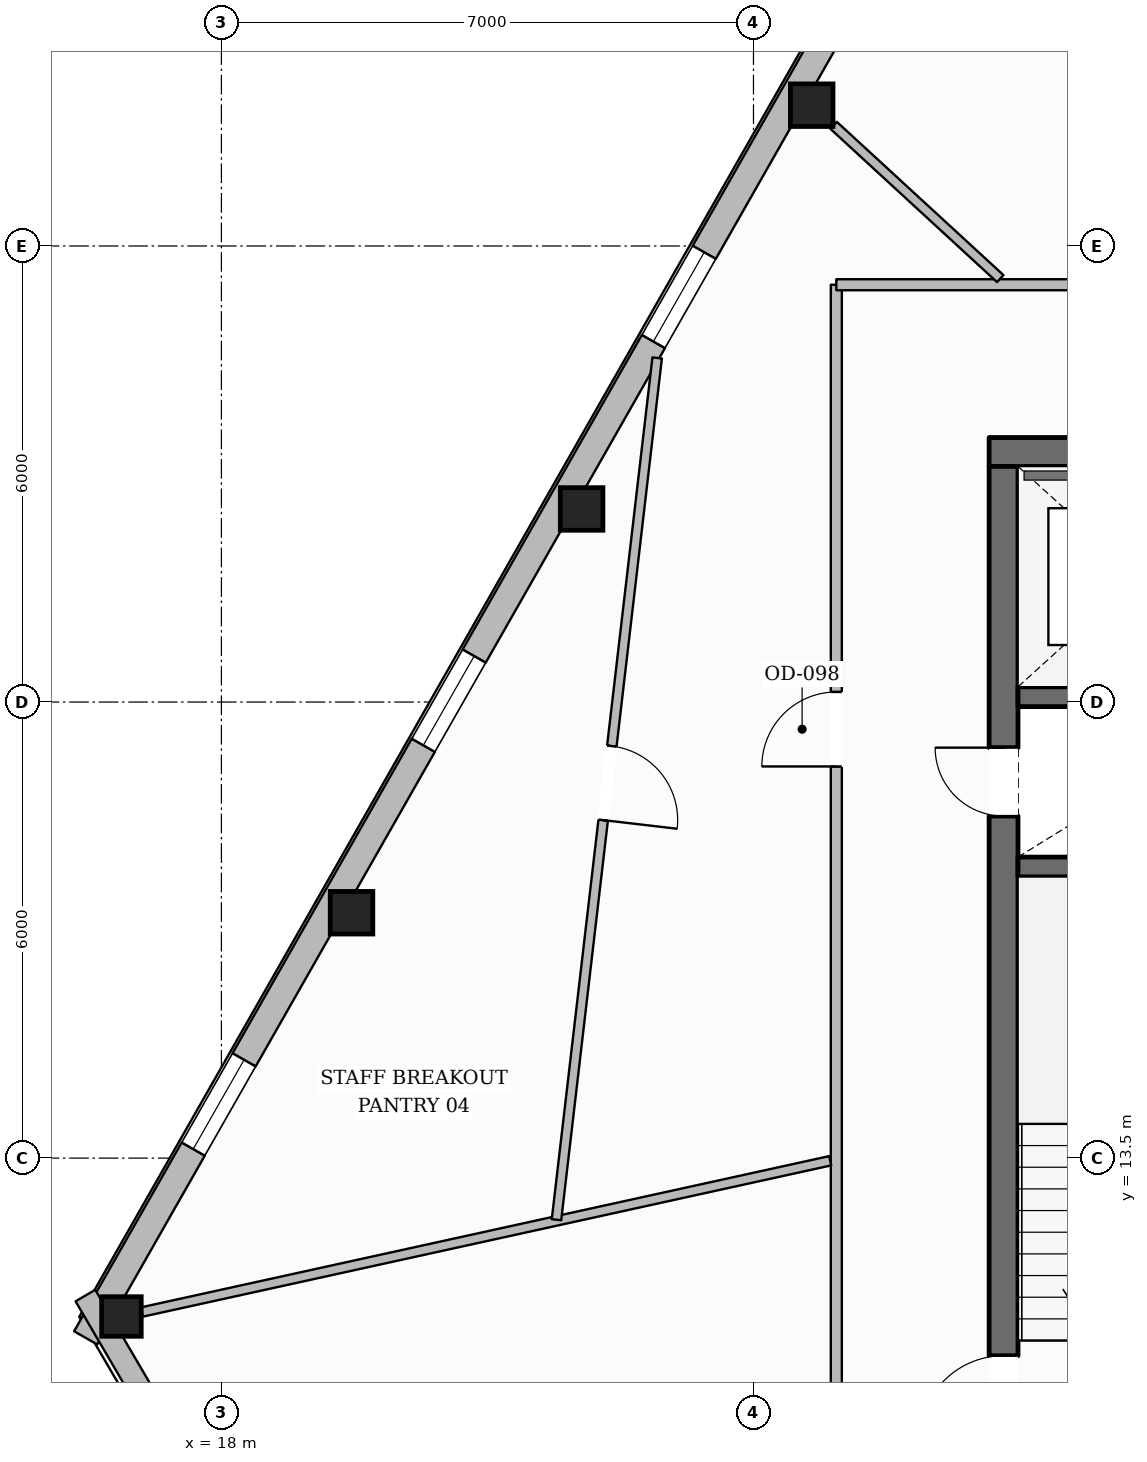
"""IFC4 building model, lengths in metres.
Left out: names, types, materials, properties, quantities, classifications, styles, units other than length and angle.
Written with IfcOpenShell. Run it as: python <this file> out.ifc"""

import sys

from ifc_helpers import new_model, si_unit, direction, frame, frame_2d, origin, origin_2d, place, context, subcontext, project, spatial, rectangle, hollow_rectangle, extrude, element, fill, save


model = new_model("IFC4")
c1 = context("Model", 3, precision=1e-05, world=origin(), true_north=direction((0.0, 1.0)))
c2 = subcontext(c1, "Body", "Model", "MODEL_VIEW")
j1 = project(units=[si_unit("LENGTHUNIT", "METRE"), si_unit("PLANEANGLEUNIT", "RADIAN")], contexts=[c1])
p1 = place(None, origin())
s1 = spatial("IfcSite", under=j1, at=p1, CompositionType="ELEMENT")
p2 = place(p1, origin())
s2 = spatial("IfcBuilding", under=s1, at=p2, CompositionType="ELEMENT")
p3 = place(p2, frame((0.0, 0.0, 258.75)))
s3 = spatial("IfcBuildingStorey", under=s2, at=p3, CompositionType="ELEMENT", Elevation=258.75)
p4 = place(p3, frame((28.1, 22.79, 0.0), z_axis=(0.0, 0.0, 1.0), x_axis=(1.0, 0.0, 0.0)))
e1 = element("IfcWall", 1, at=p4, inside=s3, PredefinedType="SOLIDWALL", context=c2, shape_type="SweptSolid", body=[
    extrude(rectangle(XDim=19.8, YDim=0.38, at=frame_2d((9.9, 0.0))), origin(), (0.0, 0.0, 1.0), 3.61),
])
p5 = place(p4, frame((6.175, 0.0, 0.0)))
e2 = element("IfcOpeningElement", 2, at=p5, cuts=e1, PredefinedType="OPENING", context=c2, shape_type="SweptSolid", body=[
    extrude(rectangle(XDim=1.05, YDim=2.15, at=frame_2d((0.525, 1.075))), frame((0.0, 0.2, 0.0), z_axis=(0.0, -1.0, 0.0), x_axis=(1.0, 0.0, 0.0)), (0.0, 0.0, 1.0), 0.4),
])
p6 = place(p4, frame((12.575, 0.0, 0.0)))
e3 = element("IfcOpeningElement", 3, at=p6, cuts=e1, PredefinedType="OPENING", context=c2, shape_type="SweptSolid", body=[
    extrude(rectangle(XDim=1.05, YDim=2.15, at=frame_2d((0.525, 1.075))), frame((0.0, 0.2, 0.0), z_axis=(0.0, -1.0, 0.0), x_axis=(1.0, 0.0, 0.0)), (0.0, 0.0, 1.0), 0.4),
])
p7 = place(p3, frame((28.29, 9.6, 0.0), z_axis=(0.0, 0.0, 1.0), x_axis=(0.0, 1.0, 0.0)))
e4 = element("IfcWall", 4, at=p7, inside=s3, PredefinedType="SOLIDWALL", context=c2, shape_type="SweptSolid", body=[
    extrude(rectangle(XDim=13.0, YDim=0.38, at=frame_2d((6.5, 0.0))), origin(), (0.0, 0.0, 1.0), 3.61),
])
p8 = place(p7, frame((0.2, 0.0, 0.0)))
e5 = element("IfcOpeningElement", 5, at=p8, cuts=e4, PredefinedType="OPENING", context=c2, shape_type="SweptSolid", body=[
    extrude(rectangle(XDim=1.1, YDim=2.15, at=frame_2d((0.55, 1.075))), frame((0.0, 0.2, 0.0), z_axis=(0.0, -1.0, 0.0), x_axis=(1.0, 0.0, 0.0)), (0.0, 0.0, 1.0), 0.4),
])
p9 = place(p7, frame((8.4, 0.0, 0.0)))
e6 = element("IfcOpeningElement", 6, at=p9, cuts=e4, PredefinedType="OPENING", context=c2, shape_type="SweptSolid", body=[
    extrude(rectangle(XDim=0.9, YDim=2.1, at=frame_2d((0.45, 1.05))), frame((0.0, 0.2, 0.0), z_axis=(0.0, -1.0, 0.0), x_axis=(1.0, 0.0, 0.0)), (0.0, 0.0, 1.0), 0.4),
])
for number, where, z_axis, x_axis in (
    (7, (28.48, 17.33, 0.0), (0.0, 0.0, 1.0), (1.0, 0.0, 0.0)),
    (8, (28.48, 19.57, 0.0), (0.0, 0.0, 1.0), (1.0, 0.0, 0.0)),
):
    element("IfcWall", number, at=place(p3, frame(where, z_axis=z_axis, x_axis=x_axis)), inside=s3, PredefinedType="SHEAR", context=c2, shape_type="SweptSolid", body=[
        extrude(rectangle(XDim=3.2, YDim=0.26, at=frame_2d((1.6, 0.0))), origin(), (0.0, 0.0, 1.0), 3.61),
    ])
for number, where, z_axis, x_axis in (
    (9, (25.766, 27.352, 0.0), (0.0, 0.0, 1.0), (1.0, 0.0, 0.0)),
    (10, (22.739, 22.04, 0.0), (0.0, 0.0, 1.0), (1.0, 0.0, 0.0)),
    (11, (19.712, 16.728, 0.0), (0.0, 0.0, 1.0), (1.0, 0.0, 0.0)),
):
    element("IfcColumn", number, at=place(p3, frame(where, z_axis=z_axis, x_axis=x_axis)), inside=s3, PredefinedType="COLUMN", context=c2, shape_type="SweptSolid", body=[
        extrude(hollow_rectangle(XDim=0.56, YDim=0.56, WallThickness=0.025, at=origin_2d()), origin(), (0.0, 0.0, 1.0), 3.61),
    ])
p10 = place(p3, frame((16.685, 11.416, 0.0), z_axis=(0.0, 0.0, 1.0), x_axis=(1.0, 0.0, 0.0)))
e12 = element("IfcColumn", 12, at=p10, inside=s3, PredefinedType="COLUMN", context=c2, shape_type="SweptSolid", body=[
    extrude(hollow_rectangle(XDim=0.52, YDim=0.52, WallThickness=0.024, at=origin_2d()), origin(), (0.0, 0.0, 1.0), 3.61),
])
p11 = place(p3, frame((16.214, 11.135, 0.0), z_axis=(0.0, 0.0, 1.0), x_axis=(0.49510347201, 0.868834018673, 0.0)))
e13 = element("IfcWall", 13, at=p11, inside=s3, PredefinedType="STANDARD", context=c2, shape_type="SweptSolid", body=[
    extrude(rectangle(XDim=37.643, YDim=0.35, at=frame_2d((18.822, 0.0))), origin(), (0.0, 0.0, 1.0), 3.196),
])
p12 = place(p11, frame((33.429, 0.0, 0.65)))
e14 = element("IfcOpeningElement", 14, at=p12, cuts=e13, PredefinedType="OPENING", context=c2, shape_type="SweptSolid", body=[
    extrude(rectangle(XDim=1.35, YDim=1.75, at=frame_2d((0.675, 0.875))), frame((0.0, 0.185, 0.0), z_axis=(0.0, -1.0, 0.0), x_axis=(1.0, 0.0, 0.0)), (0.0, 0.0, 1.0), 0.37),
])
p13 = place(p11, frame((27.315, 0.0, 0.65)))
e15 = element("IfcOpeningElement", 15, at=p13, cuts=e13, PredefinedType="OPENING", context=c2, shape_type="SweptSolid", body=[
    extrude(rectangle(XDim=1.35, YDim=1.75, at=frame_2d((0.675, 0.875))), frame((0.0, 0.185, 0.0), z_axis=(0.0, -1.0, 0.0), x_axis=(1.0, 0.0, 0.0)), (0.0, 0.0, 1.0), 0.37),
])
p14 = place(p11, frame((15.087, 0.0, 0.65)))
e16 = element("IfcOpeningElement", 16, at=p14, cuts=e13, PredefinedType="OPENING", context=c2, shape_type="SweptSolid", body=[
    extrude(rectangle(XDim=1.35, YDim=1.75, at=frame_2d((0.675, 0.875))), frame((0.0, 0.185, 0.0), z_axis=(0.0, -1.0, 0.0), x_axis=(1.0, 0.0, 0.0)), (0.0, 0.0, 1.0), 0.37),
])
p15 = place(p11, frame((8.973, 0.0, 0.65)))
e17 = element("IfcOpeningElement", 17, at=p15, cuts=e13, PredefinedType="OPENING", context=c2, shape_type="SweptSolid", body=[
    extrude(rectangle(XDim=1.35, YDim=1.75, at=frame_2d((0.675, 0.875))), frame((0.0, 0.185, 0.0), z_axis=(0.0, -1.0, 0.0), x_axis=(1.0, 0.0, 0.0)), (0.0, 0.0, 1.0), 0.37),
])
p16 = place(p11, frame((2.859, 0.0, 0.65)))
e18 = element("IfcOpeningElement", 18, at=p16, cuts=e13, PredefinedType="OPENING", context=c2, shape_type="SweptSolid", body=[
    extrude(rectangle(XDim=1.35, YDim=1.75, at=frame_2d((0.675, 0.875))), frame((0.0, 0.185, 0.0), z_axis=(0.0, -1.0, 0.0), x_axis=(1.0, 0.0, 0.0)), (0.0, 0.0, 1.0), 0.37),
])
p17 = place(p3, frame((19.979, 5.248, 0.0), z_axis=(0.0, 0.0, 1.0), x_axis=(-0.50480008765, 0.863236277915, 0.0)))
e19 = element("IfcWall", 19, at=p17, inside=s3, PredefinedType="STANDARD", context=c2, shape_type="SweptSolid", body=[
    extrude(rectangle(XDim=7.464, YDim=0.3, at=frame_2d((3.732, 0.0))), origin(), (0.0, 0.0, 1.0), 3.196),
])
p18 = place(p17, frame((3.207, 0.0, 0.65)))
e20 = element("IfcOpeningElement", 20, at=p18, cuts=e19, PredefinedType="OPENING", context=c2, shape_type="SweptSolid", body=[
    extrude(rectangle(XDim=1.05, YDim=1.7, at=frame_2d((0.525, 0.85))), frame((0.0, 0.16, 0.0), z_axis=(0.0, -1.0, 0.0), x_axis=(1.0, 0.0, 0.0)), (0.0, 0.0, 1.0), 0.32),
])
p19 = place(p3, frame((26.09, 7.21, 0.0), z_axis=(0.0, 0.0, 1.0), x_axis=(0.0, 1.0, 0.0)))
e21 = element("IfcWall", 21, at=p19, inside=s3, PredefinedType="PARTITIONING", context=c2, shape_type="SweptSolid", body=[
    extrude(rectangle(XDim=17.78, YDim=0.145, at=frame_2d((8.89, 0.0))), origin(), (0.0, 0.0, 1.0), 3.349),
])
p20 = place(p19, frame((11.443, 0.0, 0.0)))
e22 = element("IfcOpeningElement", 22, at=p20, cuts=e21, PredefinedType="OPENING", context=c2, shape_type="SweptSolid", body=[
    extrude(rectangle(XDim=0.98, YDim=2.15, at=frame_2d((0.49, 1.075))), frame((0.0, 0.083, 0.0), z_axis=(0.0, -1.0, 0.0), x_axis=(1.0, 0.0, 0.0)), (0.0, 0.0, 1.0), 0.165),
])
p21 = place(p3, frame((26.09, 24.99, 0.0), z_axis=(0.0, 0.0, 1.0), x_axis=(1.0, 0.0, 0.0)))
e23 = element("IfcWall", 23, at=p21, inside=s3, PredefinedType="PARTITIONING", context=c2, shape_type="SweptSolid", body=[
    extrude(rectangle(XDim=17.11, YDim=0.145, at=frame_2d((8.555, 0.0))), origin(), (0.0, 0.0, 1.0), 3.61),
])
p22 = place(p21, frame((8.47, 0.0, 0.0)))
e24 = element("IfcOpeningElement", 24, at=p22, cuts=e23, PredefinedType="OPENING", context=c2, shape_type="SweptSolid", body=[
    extrude(rectangle(XDim=0.88, YDim=2.1, at=frame_2d((0.44, 1.05))), frame((0.0, 0.083, 0.0), z_axis=(0.0, -1.0, 0.0), x_axis=(1.0, 0.0, 0.0)), (0.0, 0.0, 1.0), 0.165),
])
p23 = place(p21, frame((10.99, 0.0, 0.0)))
e25 = element("IfcOpeningElement", 25, at=p23, cuts=e23, PredefinedType="OPENING", context=c2, shape_type="SweptSolid", body=[
    extrude(rectangle(XDim=0.88, YDim=2.1, at=frame_2d((0.44, 1.05))), frame((0.0, 0.083, 0.0), z_axis=(0.0, -1.0, 0.0), x_axis=(1.0, 0.0, 0.0)), (0.0, 0.0, 1.0), 0.165),
])
p24 = place(p21, frame((13.37, 0.0, 0.0)))
e26 = element("IfcOpeningElement", 26, at=p24, cuts=e23, PredefinedType="OPENING", context=c2, shape_type="SweptSolid", body=[
    extrude(rectangle(XDim=0.96, YDim=2.1, at=frame_2d((0.48, 1.05))), frame((0.0, 0.083, 0.0), z_axis=(0.0, -1.0, 0.0), x_axis=(1.0, 0.0, 0.0)), (0.0, 0.0, 1.0), 0.165),
])
p25 = place(p21, frame((4.257, 0.0, 0.0)))
e27 = element("IfcOpeningElement", 27, at=p25, cuts=e23, PredefinedType="OPENING", context=c2, shape_type="SweptSolid", body=[
    extrude(rectangle(XDim=1.4, YDim=2.2, at=frame_2d((0.7, 1.1))), frame((0.0, 0.083, 0.0), z_axis=(0.0, -1.0, 0.0), x_axis=(1.0, 0.0, 0.0)), (0.0, 0.0, 1.0), 0.165),
])
p26 = place(p3, frame((28.247, 25.071, 0.0), z_axis=(0.0, 0.0, 1.0), x_axis=(-0.736030630255, 0.67694823386, 0.0)))
e28 = element("IfcWall", 28, at=p26, inside=s3, PredefinedType="PARTITIONING", context=c2, shape_type="SweptSolid", body=[
    extrude(rectangle(XDim=2.979, YDim=0.125, at=frame_2d((1.49, 0.0))), origin(), (0.0, 0.0, 1.0), 3.61),
])
p27 = place(p3, frame((26.01, 13.465, 0.0), z_axis=(0.0, 0.0, 1.0), x_axis=(-0.976700346334, -0.214607626778, 0.0)))
e29 = element("IfcWall", 29, at=p27, inside=s3, PredefinedType="PARTITIONING", context=c2, shape_type="SweptSolid", body=[
    extrude(rectangle(XDim=9.273, YDim=0.125, at=frame_2d((4.636, 0.0))), origin(), (0.0, 0.0, 1.0), 3.246),
])
p28 = place(p3, frame((23.733, 24.027, 0.0), z_axis=(0.0, 0.0, 1.0), x_axis=(-0.116028401935, -0.993245896012, 0.0)))
e30 = element("IfcWall", 30, at=p28, inside=s3, PredefinedType="PARTITIONING", context=c2, shape_type="SweptSolid", body=[
    extrude(rectangle(XDim=11.415, YDim=0.125, at=frame_2d((5.708, 0.0))), origin(), (0.0, 0.0, 1.0), 3.199),
])
p29 = place(p28, frame((5.142, 0.0, 0.0)))
e31 = element("IfcOpeningElement", 31, at=p29, cuts=e30, PredefinedType="OPENING", context=c2, shape_type="SweptSolid", body=[
    extrude(rectangle(XDim=0.98, YDim=2.15, at=frame_2d((0.49, 1.075))), frame((0.0, 0.073, 0.0), z_axis=(0.0, -1.0, 0.0), x_axis=(1.0, 0.0, 0.0)), (0.0, 0.0, 1.0), 0.145),
])
p30 = place(p14, origin())
e32 = element("IfcWindow", 32, at=p30, inside=s3, PartitioningType="SINGLE_PANEL", PredefinedType="WINDOW", context=c2, shape_type="SweptSolid", body=[
    extrude(rectangle(XDim=1.35, YDim=1.75, at=frame_2d((0.675, 0.875))), frame((0.0, 0.03, 0.0), z_axis=(0.0, -1.0, 0.0), x_axis=(1.0, 0.0, 0.0)), (0.0, 0.0, 1.0), 0.06),
])
fill(e16, e32)
p31 = place(p15, origin())
e33 = element("IfcWindow", 33, at=p31, inside=s3, PartitioningType="SINGLE_PANEL", PredefinedType="WINDOW", context=c2, shape_type="SweptSolid", body=[
    extrude(rectangle(XDim=1.35, YDim=1.75, at=frame_2d((0.675, 0.875))), frame((0.0, 0.03, 0.0), z_axis=(0.0, -1.0, 0.0), x_axis=(1.0, 0.0, 0.0)), (0.0, 0.0, 1.0), 0.06),
])
fill(e17, e33)
p32 = place(p16, origin())
e34 = element("IfcWindow", 34, at=p32, inside=s3, PartitioningType="SINGLE_PANEL", PredefinedType="WINDOW", context=c2, shape_type="SweptSolid", body=[
    extrude(rectangle(XDim=1.35, YDim=1.75, at=frame_2d((0.675, 0.875))), frame((0.0, 0.03, 0.0), z_axis=(0.0, -1.0, 0.0), x_axis=(1.0, 0.0, 0.0)), (0.0, 0.0, 1.0), 0.06),
])
fill(e18, e34)
p33 = place(p8, origin())
e35 = element("IfcDoor", 35, at=p33, inside=s3, OperationType="SINGLE_SWING_LEFT", PredefinedType="DOOR", context=c2, shape_type="SweptSolid", body=[
    extrude(rectangle(XDim=1.1, YDim=2.15, at=frame_2d((0.55, 1.075))), frame((0.0, 0.025, 0.0), z_axis=(0.0, -1.0, 0.0), x_axis=(1.0, 0.0, 0.0)), (0.0, 0.0, 1.0), 0.05),
])
fill(e5, e35)
p34 = place(p9, origin())
e36 = element("IfcDoor", 36, at=p34, inside=s3, OperationType="SINGLE_SWING_RIGHT", PredefinedType="DOOR", context=c2, shape_type="SweptSolid", body=[
    extrude(rectangle(XDim=0.9, YDim=2.1, at=frame_2d((0.45, 1.05))), frame((0.0, 0.025, 0.0), z_axis=(0.0, -1.0, 0.0), x_axis=(1.0, 0.0, 0.0)), (0.0, 0.0, 1.0), 0.05),
])
fill(e6, e36)
p35 = place(p20, origin())
e37 = element("IfcDoor", 37, at=p35, inside=s3, OperationType="SINGLE_SWING_LEFT", PredefinedType="DOOR", context=c2, shape_type="SweptSolid", body=[
    extrude(rectangle(XDim=0.98, YDim=2.15, at=frame_2d((0.49, 1.075))), frame((0.0, 0.025, 0.0), z_axis=(0.0, -1.0, 0.0), x_axis=(1.0, 0.0, 0.0)), (0.0, 0.0, 1.0), 0.05),
])
fill(e22, e37)
p36 = place(p29, origin())
e38 = element("IfcDoor", 38, at=p36, inside=s3, OperationType="SINGLE_SWING_RIGHT", PredefinedType="DOOR", context=c2, shape_type="SweptSolid", body=[
    extrude(rectangle(XDim=0.98, YDim=2.15, at=frame_2d((0.49, 1.075))), frame((0.0, 0.025, 0.0), z_axis=(0.0, -1.0, 0.0), x_axis=(1.0, 0.0, 0.0)), (0.0, 0.0, 1.0), 0.05),
])
fill(e31, e38)
save(model, sys.argv[1])
